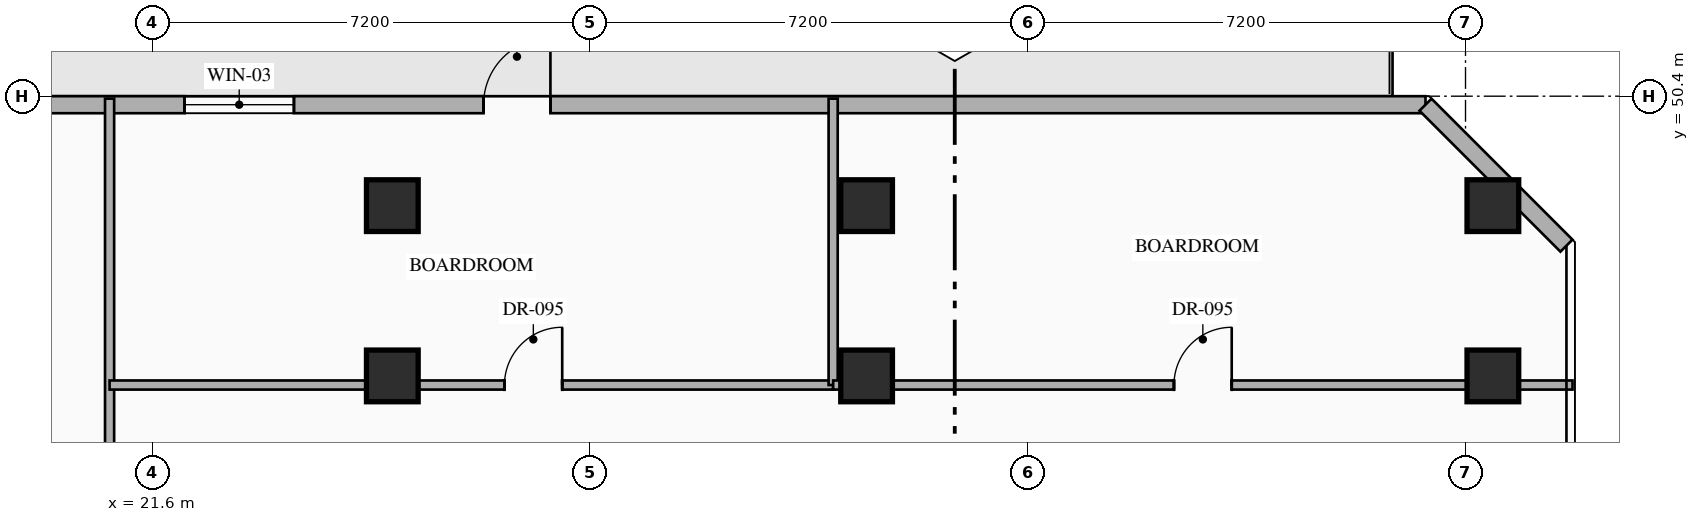
"""IFC4 building model, lengths in metres.
Left out: names, types, materials, properties, quantities, classifications, styles, units other than length and angle.
Written with IfcOpenShell. Run it as: python <this file> out.ifc"""

import sys

from ifc_helpers import new_model, si_unit, direction, frame, frame_2d, origin, origin_2d, place, context, subcontext, project, spatial, rectangle, hollow_rectangle, extrude, element, fill, save


model = new_model("IFC4")
c1 = context("Model", 3, precision=1e-05, world=origin(), true_north=direction((0.0, 1.0)))
c2 = subcontext(c1, "Body", "Model", "MODEL_VIEW")
j1 = project(units=[si_unit("LENGTHUNIT", "METRE"), si_unit("PLANEANGLEUNIT", "RADIAN")], contexts=[c1])
p1 = place(None, origin())
s1 = spatial("IfcSite", under=j1, at=p1, CompositionType="ELEMENT")
p2 = place(p1, origin())
s2 = spatial("IfcBuilding", under=s1, at=p2, CompositionType="ELEMENT")
p3 = place(p2, frame((0.0, 0.0, 138.45)))
s3 = spatial("IfcBuildingStorey", under=s2, at=p3, CompositionType="ELEMENT", Elevation=138.45)
for number, where, z_axis, x_axis in (
    (1, (25.55, 45.8, 0.0), (0.0, 0.0, 1.0), (1.0, 0.0, 0.0)),
    (2, (33.35, 45.8, 0.0), (0.0, 0.0, 1.0), (1.0, 0.0, 0.0)),
    (3, (43.65, 45.8, 0.0), (0.0, 0.0, 1.0), (1.0, 0.0, 0.0)),
    (4, (25.55, 48.6, 0.0), (0.0, 0.0, 1.0), (1.0, 0.0, 0.0)),
    (5, (33.35, 48.6, 0.0), (0.0, 0.0, 1.0), (1.0, 0.0, 0.0)),
    (6, (43.65, 48.6, 0.0), (0.0, 0.0, 1.0), (1.0, 0.0, 0.0)),
):
    element("IfcColumn", number, at=place(p3, frame(where, z_axis=z_axis, x_axis=x_axis)), inside=s3, PredefinedType="COLUMN", context=c2, shape_type="SweptSolid", body=[
        extrude(hollow_rectangle(XDim=0.85, YDim=0.85, WallThickness=0.032, at=origin_2d()), origin(), (0.0, 0.0, 1.0), 3.6),
    ])
p4 = place(p3, frame((12.058, 50.26, 0.0), z_axis=(0.0, 0.0, 1.0), x_axis=(1.0, 0.0, 0.0)))
e7 = element("IfcWall", 7, at=p4, inside=s3, PredefinedType="STANDARD", context=c2, shape_type="SweptSolid", body=[
    extrude(rectangle(XDim=30.484, YDim=0.28, at=frame_2d((15.242, 0.0))), origin(), (0.0, 0.0, 1.0), 3.35),
])
p5 = place(p4, frame((14.992, 0.0, 0.0)))
e8 = element("IfcOpeningElement", 8, at=p5, cuts=e7, PredefinedType="OPENING", context=c2, shape_type="SweptSolid", body=[
    extrude(rectangle(XDim=1.1, YDim=2.2, at=frame_2d((0.55, 1.1))), frame((0.0, 0.15, 0.0), z_axis=(0.0, -1.0, 0.0), x_axis=(1.0, 0.0, 0.0)), (0.0, 0.0, 1.0), 0.3),
])
p6 = place(p4, frame((10.074, 0.0, 0.85)))
e9 = element("IfcOpeningElement", 9, at=p6, cuts=e7, PredefinedType="OPENING", context=c2, shape_type="SweptSolid", body=[
    extrude(rectangle(XDim=1.8, YDim=2.1, at=frame_2d((0.9, 1.05))), frame((0.0, 0.15, 0.0), z_axis=(0.0, -1.0, 0.0), x_axis=(1.0, 0.0, 0.0)), (0.0, 0.0, 1.0), 0.3),
])
p7 = place(p3, frame((42.542, 50.26, 0.0), z_axis=(0.0, 0.0, 1.0), x_axis=(0.707106781187, -0.707106781187, 0.0)))
e10 = element("IfcWall", 10, at=p7, inside=s3, PredefinedType="STANDARD", context=c2, shape_type="SweptSolid", body=[
    extrude(rectangle(XDim=3.278, YDim=0.28, at=frame_2d((1.639, 0.0))), origin(), (0.0, 0.0, 1.0), 3.35),
])
p8 = place(p3, frame((20.9, 35.8, 0.0), z_axis=(0.0, 0.0, 1.0), x_axis=(0.0, 1.0, 0.0)))
e11 = element("IfcWall", 11, at=p8, inside=s3, PredefinedType="PARTITIONING", context=c2, shape_type="SweptSolid", body=[
    extrude(rectangle(XDim=14.56, YDim=0.15, at=frame_2d((7.28, 0.0))), origin(), (0.0, 0.0, 1.0), 3.35),
])
p9 = place(p8, frame((7.448, 0.0, 0.0)))
e12 = element("IfcOpeningElement", 12, at=p9, cuts=e11, PredefinedType="OPENING", context=c2, shape_type="SweptSolid", body=[
    extrude(rectangle(XDim=0.95, YDim=2.15, at=frame_2d((0.475, 1.075))), frame((0.0, 0.085, 0.0), z_axis=(0.0, -1.0, 0.0), x_axis=(1.0, 0.0, 0.0)), (0.0, 0.0, 1.0), 0.17),
])
p10 = place(p3, frame((20.9, 45.65, 0.0), z_axis=(0.0, 0.0, 1.0), x_axis=(1.0, 0.0, 0.0)))
e13 = element("IfcWall", 13, at=p10, inside=s3, PredefinedType="PARTITIONING", context=c2, shape_type="SweptSolid", body=[
    extrude(rectangle(XDim=11.9, YDim=0.15, at=frame_2d((5.95, 0.0))), origin(), (0.0, 0.0, 1.0), 2.695),
])
p11 = place(p10, frame((6.494, 0.0, 0.0)))
e14 = element("IfcOpeningElement", 14, at=p11, cuts=e13, PredefinedType="OPENING", context=c2, shape_type="SweptSolid", body=[
    extrude(rectangle(XDim=0.95, YDim=2.15, at=frame_2d((0.475, 1.075))), frame((0.0, 0.085, 0.0), z_axis=(0.0, -1.0, 0.0), x_axis=(1.0, 0.0, 0.0)), (0.0, 0.0, 1.0), 0.17),
])
p12 = place(p3, frame((32.8, 45.65, 0.0), z_axis=(0.0, 0.0, 1.0), x_axis=(0.0, 1.0, 0.0)))
e15 = element("IfcWall", 15, at=p12, inside=s3, PredefinedType="PARTITIONING", context=c2, shape_type="SweptSolid", body=[
    extrude(rectangle(XDim=4.71, YDim=0.15, at=frame_2d((2.355, 0.0))), origin(), (0.0, 0.0, 1.0), 3.35),
])
p13 = place(p3, frame((32.8, 45.65, 0.0), z_axis=(0.0, 0.0, 1.0), x_axis=(1.0, 0.0, 0.0)))
e16 = element("IfcWall", 16, at=p13, inside=s3, PredefinedType="PARTITIONING", context=c2, shape_type="SweptSolid", body=[
    extrude(rectangle(XDim=12.16, YDim=0.15, at=frame_2d((6.08, 0.0))), origin(), (0.0, 0.0, 1.0), 2.695),
])
p14 = place(p13, frame((5.605, 0.0, 0.0)))
e17 = element("IfcOpeningElement", 17, at=p14, cuts=e16, PredefinedType="OPENING", context=c2, shape_type="SweptSolid", body=[
    extrude(rectangle(XDim=0.95, YDim=2.15, at=frame_2d((0.475, 1.075))), frame((0.0, 0.085, 0.0), z_axis=(0.0, -1.0, 0.0), x_axis=(1.0, 0.0, 0.0)), (0.0, 0.0, 1.0), 0.17),
])
p15 = place(p5, origin())
e18 = element("IfcDoor", 18, at=p15, inside=s3, OperationType="SINGLE_SWING_RIGHT", PredefinedType="DOOR", context=c2, shape_type="SweptSolid", body=[
    extrude(rectangle(XDim=1.1, YDim=2.2, at=frame_2d((0.55, 1.1))), frame((0.0, 0.025, 0.0), z_axis=(0.0, -1.0, 0.0), x_axis=(1.0, 0.0, 0.0)), (0.0, 0.0, 1.0), 0.05),
])
fill(e8, e18)
p16 = place(p6, origin())
e19 = element("IfcWindow", 19, at=p16, inside=s3, PartitioningType="SINGLE_PANEL", PredefinedType="WINDOW", context=c2, shape_type="SweptSolid", body=[
    extrude(rectangle(XDim=1.8, YDim=2.1, at=frame_2d((0.9, 1.05))), frame((0.0, 0.03, 0.0), z_axis=(0.0, -1.0, 0.0), x_axis=(1.0, 0.0, 0.0)), (0.0, 0.0, 1.0), 0.06),
])
fill(e9, e19)
p17 = place(p11, origin())
e20 = element("IfcDoor", 20, at=p17, inside=s3, OperationType="SINGLE_SWING_RIGHT", PredefinedType="DOOR", context=c2, shape_type="SweptSolid", body=[
    extrude(rectangle(XDim=0.95, YDim=2.15, at=frame_2d((0.475, 1.075))), frame((0.0, 0.025, 0.0), z_axis=(0.0, -1.0, 0.0), x_axis=(1.0, 0.0, 0.0)), (0.0, 0.0, 1.0), 0.05),
])
fill(e14, e20)
p18 = place(p14, origin())
e21 = element("IfcDoor", 21, at=p18, inside=s3, OperationType="SINGLE_SWING_RIGHT", PredefinedType="DOOR", context=c2, shape_type="SweptSolid", body=[
    extrude(rectangle(XDim=0.95, YDim=2.15, at=frame_2d((0.475, 1.075))), frame((0.0, 0.025, 0.0), z_axis=(0.0, -1.0, 0.0), x_axis=(1.0, 0.0, 0.0)), (0.0, 0.0, 1.0), 0.05),
])
fill(e17, e21)
save(model, sys.argv[1])
